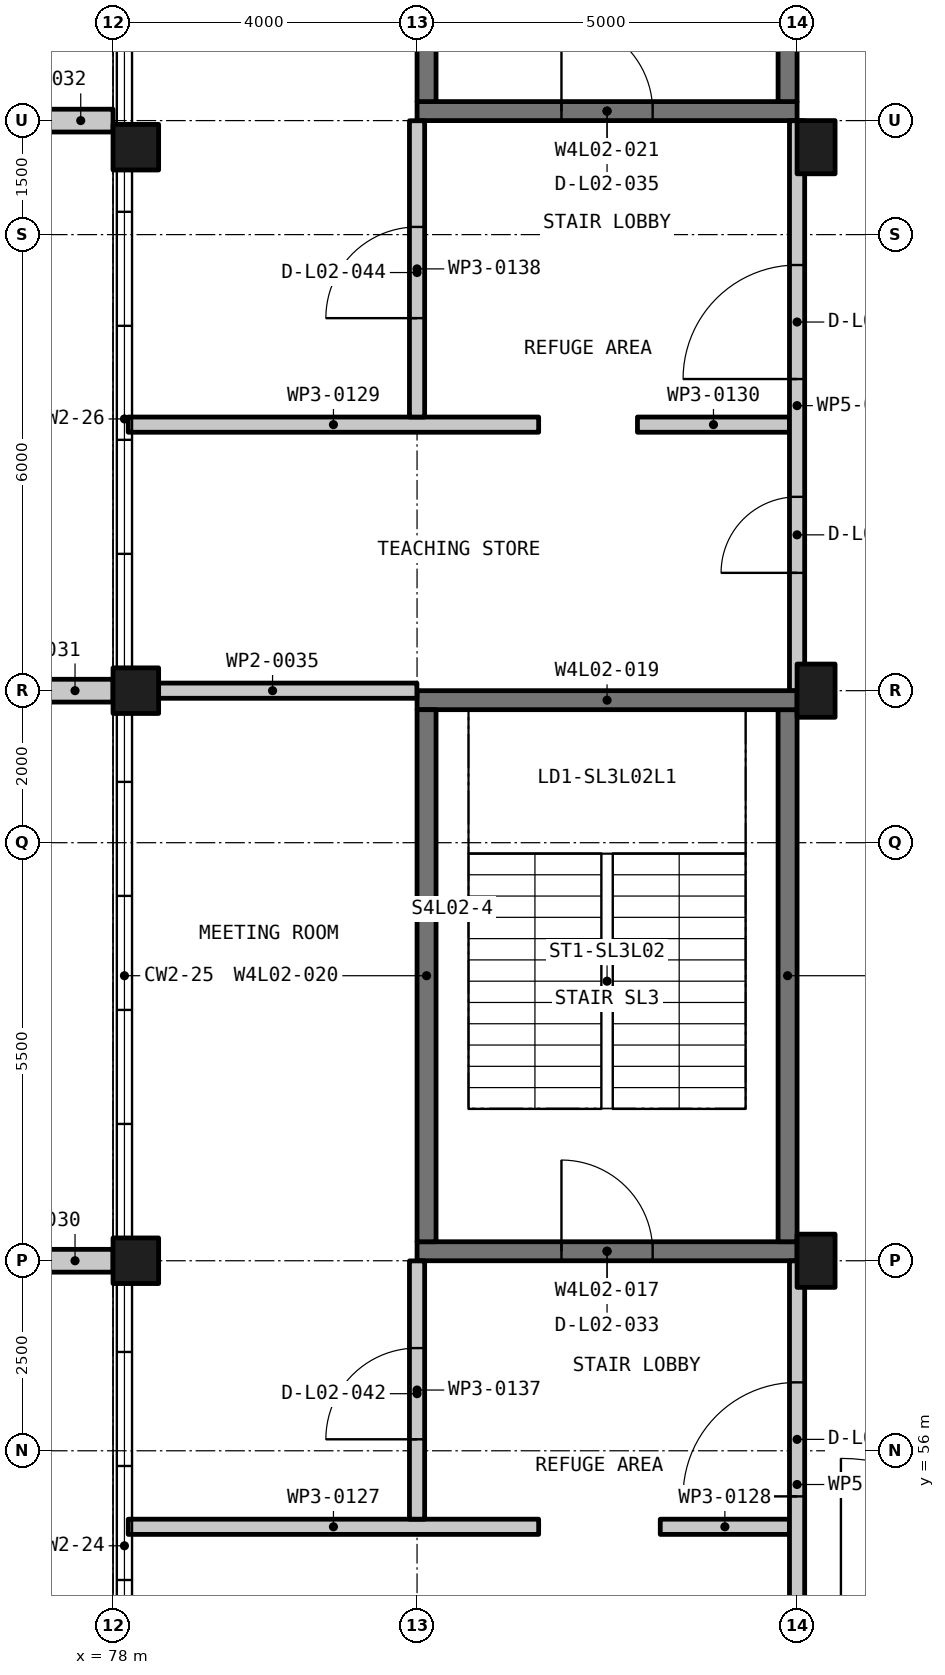
"""IFC4 building model, lengths in metres.
Left out: names, types, materials, properties, quantities, classifications, styles, units other than length and angle.
Written with IfcOpenShell. Run it as: python <this file> out.ifc"""

import sys

from ifc_helpers import new_model, si_unit, direction, frame, frame_2d, origin, origin_2d, place, context, subcontext, project, spatial, rectangle, extrude, element, fill, save


model = new_model("IFC4")
c1 = context("Model", 3, precision=1e-05, world=origin(), true_north=direction((0.0, 1.0)))
c2 = subcontext(c1, "Body", "Model", "MODEL_VIEW")
j1 = project(units=[si_unit("LENGTHUNIT", "METRE"), si_unit("PLANEANGLEUNIT", "RADIAN")], contexts=[c1])
p1 = place(None, origin())
s1 = spatial("IfcSite", under=j1, at=p1, CompositionType="ELEMENT")
p2 = place(p1, origin())
s2 = spatial("IfcBuilding", under=s1, at=p2, CompositionType="ELEMENT")
p3 = place(p2, frame((0.0, 0.0, 11.25)))
s3 = spatial("IfcBuildingStorey", under=s2, at=p3, CompositionType="ELEMENT", Elevation=11.25)
for number, where, z_axis, x_axis in (
    (1, (78.3, 58.5, -0.3), (0.0, 0.0, 1.0), (1.0, 0.0, 0.0)),
    (2, (78.3, 66.0, -0.3), (0.0, 0.0, 1.0), (1.0, 0.0, 0.0)),
    (3, (78.3, 73.15, -0.3), (0.0, 0.0, 1.0), (1.0, 0.0, 0.0)),
):
    element("IfcColumn", number, at=place(p3, frame(where, z_axis=z_axis, x_axis=x_axis)), inside=s3, PredefinedType="COLUMN", context=c2, shape_type="SweptSolid", body=[
        extrude(rectangle(XDim=0.6, YDim=0.6, at=origin_2d()), origin(), (0.0, 0.0, 1.0), 4.5),
    ])
for number, where, z_axis, x_axis in (
    (4, (87.25, 58.5, -0.3), (0.0, 0.0, 1.0), (1.0, 0.0, 0.0)),
    (5, (87.25, 66.0, -0.3), (0.0, 0.0, 1.0), (1.0, 0.0, 0.0)),
    (6, (87.25, 73.15, -0.3), (0.0, 0.0, 1.0), (1.0, 0.0, 0.0)),
):
    element("IfcColumn", number, at=place(p3, frame(where, z_axis=z_axis, x_axis=x_axis)), inside=s3, PredefinedType="COLUMN", context=c2, shape_type="SweptSolid", body=[
        extrude(rectangle(XDim=0.5, YDim=0.7, at=origin_2d()), origin(), (0.0, 0.0, 1.0), 4.5),
    ])
p4 = place(p3, frame((82.0, 58.625, -0.3), z_axis=(0.0, 0.0, 1.0), x_axis=(1.0, 0.0, 0.0)))
e7 = element("IfcWall", 7, at=p4, inside=s3, PredefinedType="SHEAR", context=c2, shape_type="SweptSolid", body=[
    extrude(rectangle(XDim=5.0, YDim=0.25, at=frame_2d((2.5, 0.0))), origin(), (0.0, 0.0, 1.0), 4.5),
])
p5 = place(p4, frame((1.9, 0.0, 0.3)))
e8 = element("IfcOpeningElement", 8, at=p5, cuts=e7, PredefinedType="OPENING", context=c2, shape_type="SweptSolid", body=[
    extrude(rectangle(XDim=1.2, YDim=2.2, at=frame_2d((0.6, 1.1))), frame((0.0, 0.135, 0.0), z_axis=(0.0, -1.0, 0.0), x_axis=(1.0, 0.0, 0.0)), (0.0, 0.0, 1.0), 0.27),
])
p6 = place(p3, frame((86.875, 58.75, -0.3), z_axis=(0.0, 0.0, 1.0), x_axis=(0.0, 1.0, 0.0)))
e9 = element("IfcWall", 9, at=p6, inside=s3, PredefinedType="SHEAR", context=c2, shape_type="SweptSolid", body=[
    extrude(rectangle(XDim=7.0, YDim=0.25, at=frame_2d((3.5, 0.0))), origin(), (0.0, 0.0, 1.0), 4.5),
])
p7 = place(p3, frame((82.0, 65.875, -0.3), z_axis=(0.0, 0.0, 1.0), x_axis=(1.0, 0.0, 0.0)))
e10 = element("IfcWall", 10, at=p7, inside=s3, PredefinedType="SHEAR", context=c2, shape_type="SweptSolid", body=[
    extrude(rectangle(XDim=5.0, YDim=0.25, at=frame_2d((2.5, 0.0))), origin(), (0.0, 0.0, 1.0), 4.5),
])
p8 = place(p3, frame((82.125, 58.75, -0.3), z_axis=(0.0, 0.0, 1.0), x_axis=(0.0, 1.0, 0.0)))
e11 = element("IfcWall", 11, at=p8, inside=s3, PredefinedType="SHEAR", context=c2, shape_type="SweptSolid", body=[
    extrude(rectangle(XDim=7.0, YDim=0.25, at=frame_2d((3.5, 0.0))), origin(), (0.0, 0.0, 1.0), 4.5),
])
p9 = place(p3, frame((82.0, 73.625, -0.3), z_axis=(0.0, 0.0, 1.0), x_axis=(1.0, 0.0, 0.0)))
e12 = element("IfcWall", 12, at=p9, inside=s3, PredefinedType="SHEAR", context=c2, shape_type="SweptSolid", body=[
    extrude(rectangle(XDim=5.0, YDim=0.25, at=frame_2d((2.5, 0.0))), origin(), (0.0, 0.0, 1.0), 4.5),
])
p10 = place(p9, frame((1.9, 0.0, 0.3)))
e13 = element("IfcOpeningElement", 13, at=p10, cuts=e12, PredefinedType="OPENING", context=c2, shape_type="SweptSolid", body=[
    extrude(rectangle(XDim=1.2, YDim=2.2, at=frame_2d((0.6, 1.1))), frame((0.0, 0.135, 0.0), z_axis=(0.0, -1.0, 0.0), x_axis=(1.0, 0.0, 0.0)), (0.0, 0.0, 1.0), 0.27),
])
for number, where, z_axis, x_axis in (
    (14, (86.875, 73.75, -0.3), (0.0, 0.0, 1.0), (0.0, 1.0, 0.0)),
    (15, (82.125, 73.75, -0.3), (0.0, 0.0, 1.0), (0.0, 1.0, 0.0)),
):
    element("IfcWall", number, at=place(p3, frame(where, z_axis=z_axis, x_axis=x_axis)), inside=s3, PredefinedType="SHEAR", context=c2, shape_type="SweptSolid", body=[
        extrude(rectangle(XDim=7.0, YDim=0.25, at=frame_2d((3.5, 0.0))), origin(), (0.0, 0.0, 1.0), 4.5),
    ])
for number, where, z_axis, x_axis in (
    (16, (77.0, 58.5, 0.0), (0.0, 0.0, 1.0), (1.0, 0.0, 0.0)),
    (17, (77.0, 66.0, 0.0), (0.0, 0.0, 1.0), (1.0, 0.0, 0.0)),
):
    element("IfcWall", number, at=place(p3, frame(where, z_axis=z_axis, x_axis=x_axis)), inside=s3, PredefinedType="SOLIDWALL", context=c2, shape_type="SweptSolid", body=[
        extrude(rectangle(XDim=1.0, YDim=0.3, at=frame_2d((0.5, 0.0))), origin(), (0.0, 0.0, 1.0), 4.5),
    ])
p11 = place(p3, frame((77.15, 73.5, 0.0), z_axis=(0.0, 0.0, 1.0), x_axis=(1.0, 0.0, 0.0)))
e18 = element("IfcWall", 18, at=p11, inside=s3, PredefinedType="SOLIDWALL", context=c2, shape_type="SweptSolid", body=[
    extrude(rectangle(XDim=0.85, YDim=0.3, at=frame_2d((0.425, 0.0))), origin(), (0.0, 0.0, 1.0), 4.5),
])
p12 = place(p3, frame((78.2, 55.0, 0.0), z_axis=(0.0, 0.0, 1.0), x_axis=(1.0, 0.0, 0.0)))
e19 = element("IfcWall", 19, at=p12, inside=s3, PredefinedType="PARTITIONING", context=c2, shape_type="SweptSolid", body=[
    extrude(rectangle(XDim=5.4, YDim=0.2, at=frame_2d((2.7, 0.0))), origin(), (0.0, 0.0, 1.0), 3.4),
])
p13 = place(p3, frame((85.2, 55.0, 0.0), z_axis=(0.0, 0.0, 1.0), x_axis=(1.0, 0.0, 0.0)))
e20 = element("IfcWall", 20, at=p13, inside=s3, PredefinedType="PARTITIONING", context=c2, shape_type="SweptSolid", body=[
    extrude(rectangle(XDim=1.7, YDim=0.2, at=frame_2d((0.85, 0.0))), origin(), (0.0, 0.0, 1.0), 3.6),
])
p14 = place(p3, frame((78.2, 66.0, 0.0), z_axis=(0.0, 0.0, 1.0), x_axis=(1.0, 0.0, 0.0)))
e21 = element("IfcWall", 21, at=p14, inside=s3, PredefinedType="PARTITIONING", context=c2, shape_type="SweptSolid", body=[
    extrude(rectangle(XDim=3.798, YDim=0.2, at=frame_2d((1.899, 0.0))), origin(), (0.0, 0.0, 1.0), 3.4),
])
p15 = place(p3, frame((78.2, 69.5, 0.0), z_axis=(0.0, 0.0, 1.0), x_axis=(1.0, 0.0, 0.0)))
e22 = element("IfcWall", 22, at=p15, inside=s3, PredefinedType="PARTITIONING", context=c2, shape_type="SweptSolid", body=[
    extrude(rectangle(XDim=5.4, YDim=0.2, at=frame_2d((2.7, 0.0))), origin(), (0.0, 0.0, 1.0), 3.4),
])
p16 = place(p3, frame((84.9, 69.5, 0.0), z_axis=(0.0, 0.0, 1.0), x_axis=(1.0, 0.0, 0.0)))
e23 = element("IfcWall", 23, at=p16, inside=s3, PredefinedType="PARTITIONING", context=c2, shape_type="SweptSolid", body=[
    extrude(rectangle(XDim=2.0, YDim=0.2, at=frame_2d((1.0, 0.0))), origin(), (0.0, 0.0, 1.0), 3.6),
])
p17 = place(p3, frame((87.0, 52.615, 0.0), z_axis=(0.0, 0.0, 1.0), x_axis=(0.0, 1.0, 0.0)))
e24 = element("IfcWall", 24, at=p17, inside=s3, PredefinedType="PARTITIONING", context=c2, shape_type="SweptSolid", body=[
    extrude(rectangle(XDim=5.884, YDim=0.2, at=frame_2d((2.942, 0.0))), origin(), (0.0, 0.0, 1.0), 3.4),
])
p18 = place(p17, frame((2.785, 0.0, 0.0)))
e25 = element("IfcOpeningElement", 25, at=p18, cuts=e24, PredefinedType="OPENING", context=c2, shape_type="SweptSolid", body=[
    extrude(rectangle(XDim=1.5, YDim=2.1, at=frame_2d((0.75, 1.05))), frame((0.0, 0.11, 0.0), z_axis=(0.0, -1.0, 0.0), x_axis=(1.0, 0.0, 0.0)), (0.0, 0.0, 1.0), 0.22),
])
p19 = place(p3, frame((87.0, 66.002, 0.0), z_axis=(0.0, 0.0, 1.0), x_axis=(0.0, 1.0, 0.0)))
e26 = element("IfcWall", 26, at=p19, inside=s3, PredefinedType="PARTITIONING", context=c2, shape_type="SweptSolid", body=[
    extrude(rectangle(XDim=7.496, YDim=0.2, at=frame_2d((3.748, 0.0))), origin(), (0.0, 0.0, 1.0), 3.4),
])
p20 = place(p19, frame((4.098, 0.0, 0.0)))
e27 = element("IfcOpeningElement", 27, at=p20, cuts=e26, PredefinedType="OPENING", context=c2, shape_type="SweptSolid", body=[
    extrude(rectangle(XDim=1.5, YDim=2.1, at=frame_2d((0.75, 1.05))), frame((0.0, 0.11, 0.0), z_axis=(0.0, -1.0, 0.0), x_axis=(1.0, 0.0, 0.0)), (0.0, 0.0, 1.0), 0.22),
])
p21 = place(p19, frame((1.548, 0.0, 0.0)))
e28 = element("IfcOpeningElement", 28, at=p21, cuts=e26, PredefinedType="OPENING", context=c2, shape_type="SweptSolid", body=[
    extrude(rectangle(XDim=1.0, YDim=2.1, at=frame_2d((0.5, 1.05))), frame((0.0, 0.11, 0.0), z_axis=(0.0, -1.0, 0.0), x_axis=(1.0, 0.0, 0.0)), (0.0, 0.0, 1.0), 0.22),
])
p22 = place(p3, frame((82.0, 55.1, 0.0), z_axis=(0.0, 0.0, 1.0), x_axis=(0.0, 1.0, 0.0)))
e29 = element("IfcWall", 29, at=p22, inside=s3, PredefinedType="PARTITIONING", context=c2, shape_type="SweptSolid", body=[
    extrude(rectangle(XDim=3.398, YDim=0.2, at=frame_2d((1.699, 0.0))), origin(), (0.0, 0.0, 1.0), 3.4),
])
p23 = place(p22, frame((1.051, 0.0, 0.0)))
e30 = element("IfcOpeningElement", 30, at=p23, cuts=e29, PredefinedType="OPENING", context=c2, shape_type="SweptSolid", body=[
    extrude(rectangle(XDim=1.2, YDim=2.1, at=frame_2d((0.6, 1.05))), frame((0.0, 0.11, 0.0), z_axis=(0.0, -1.0, 0.0), x_axis=(1.0, 0.0, 0.0)), (0.0, 0.0, 1.0), 0.22),
])
p24 = place(p3, frame((82.0, 69.6, 0.0), z_axis=(0.0, 0.0, 1.0), x_axis=(0.0, 1.0, 0.0)))
e31 = element("IfcWall", 31, at=p24, inside=s3, PredefinedType="PARTITIONING", context=c2, shape_type="SweptSolid", body=[
    extrude(rectangle(XDim=3.898, YDim=0.2, at=frame_2d((1.949, 0.0))), origin(), (0.0, 0.0, 1.0), 3.4),
])
p25 = place(p24, frame((1.301, 0.0, 0.0)))
e32 = element("IfcOpeningElement", 32, at=p25, cuts=e31, PredefinedType="OPENING", context=c2, shape_type="SweptSolid", body=[
    extrude(rectangle(XDim=1.2, YDim=2.1, at=frame_2d((0.6, 1.05))), frame((0.0, 0.11, 0.0), z_axis=(0.0, -1.0, 0.0), x_axis=(1.0, 0.0, 0.0)), (0.0, 0.0, 1.0), 0.22),
])
p26 = place(p5, origin())
e33 = element("IfcDoor", 33, at=p26, inside=s3, OperationType="SINGLE_SWING_LEFT", PredefinedType="DOOR", context=c2, shape_type="SweptSolid", body=[
    extrude(rectangle(XDim=1.2, YDim=2.2, at=frame_2d((0.6, 1.1))), frame((0.0, 0.025, 0.0), z_axis=(0.0, -1.0, 0.0), x_axis=(1.0, 0.0, 0.0)), (0.0, 0.0, 1.0), 0.05),
])
fill(e8, e33)
p27 = place(p18, origin())
e34 = element("IfcDoor", 34, at=p27, inside=s3, OperationType="DOUBLE_DOOR_SINGLE_SWING", PredefinedType="DOOR", context=c2, shape_type="SweptSolid", body=[
    extrude(rectangle(XDim=1.5, YDim=2.1, at=frame_2d((0.75, 1.05))), frame((0.0, 0.025, 0.0), z_axis=(0.0, -1.0, 0.0), x_axis=(1.0, 0.0, 0.0)), (0.0, 0.0, 1.0), 0.05),
])
fill(e25, e34)
p28 = place(p10, origin())
e35 = element("IfcDoor", 35, at=p28, inside=s3, OperationType="SINGLE_SWING_LEFT", PredefinedType="DOOR", context=c2, shape_type="SweptSolid", body=[
    extrude(rectangle(XDim=1.2, YDim=2.2, at=frame_2d((0.6, 1.1))), frame((0.0, 0.025, 0.0), z_axis=(0.0, -1.0, 0.0), x_axis=(1.0, 0.0, 0.0)), (0.0, 0.0, 1.0), 0.05),
])
fill(e13, e35)
p29 = place(p20, origin())
e36 = element("IfcDoor", 36, at=p29, inside=s3, OperationType="DOUBLE_DOOR_SINGLE_SWING", PredefinedType="DOOR", context=c2, shape_type="SweptSolid", body=[
    extrude(rectangle(XDim=1.5, YDim=2.1, at=frame_2d((0.75, 1.05))), frame((0.0, 0.025, 0.0), z_axis=(0.0, -1.0, 0.0), x_axis=(1.0, 0.0, 0.0)), (0.0, 0.0, 1.0), 0.05),
])
fill(e27, e36)
p30 = place(p23, origin())
e37 = element("IfcDoor", 37, at=p30, inside=s3, OperationType="SINGLE_SWING_RIGHT", PredefinedType="DOOR", context=c2, shape_type="SweptSolid", body=[
    extrude(rectangle(XDim=1.2, YDim=2.1, at=frame_2d((0.6, 1.05))), frame((0.0, 0.025, 0.0), z_axis=(0.0, -1.0, 0.0), x_axis=(1.0, 0.0, 0.0)), (0.0, 0.0, 1.0), 0.05),
])
fill(e30, e37)
p31 = place(p21, origin())
e38 = element("IfcDoor", 38, at=p31, inside=s3, OperationType="SINGLE_SWING_RIGHT", PredefinedType="DOOR", context=c2, shape_type="SweptSolid", body=[
    extrude(rectangle(XDim=1.0, YDim=2.1, at=frame_2d((0.5, 1.05))), frame((0.0, 0.025, 0.0), z_axis=(0.0, -1.0, 0.0), x_axis=(1.0, 0.0, 0.0)), (0.0, 0.0, 1.0), 0.05),
])
fill(e28, e38)
p32 = place(p25, origin())
e39 = element("IfcDoor", 39, at=p32, inside=s3, OperationType="SINGLE_SWING_RIGHT", PredefinedType="DOOR", context=c2, shape_type="SweptSolid", body=[
    extrude(rectangle(XDim=1.2, YDim=2.1, at=frame_2d((0.6, 1.05))), frame((0.0, 0.025, 0.0), z_axis=(0.0, -1.0, 0.0), x_axis=(1.0, 0.0, 0.0)), (0.0, 0.0, 1.0), 0.05),
])
fill(e32, e39)
save(model, sys.argv[1])
